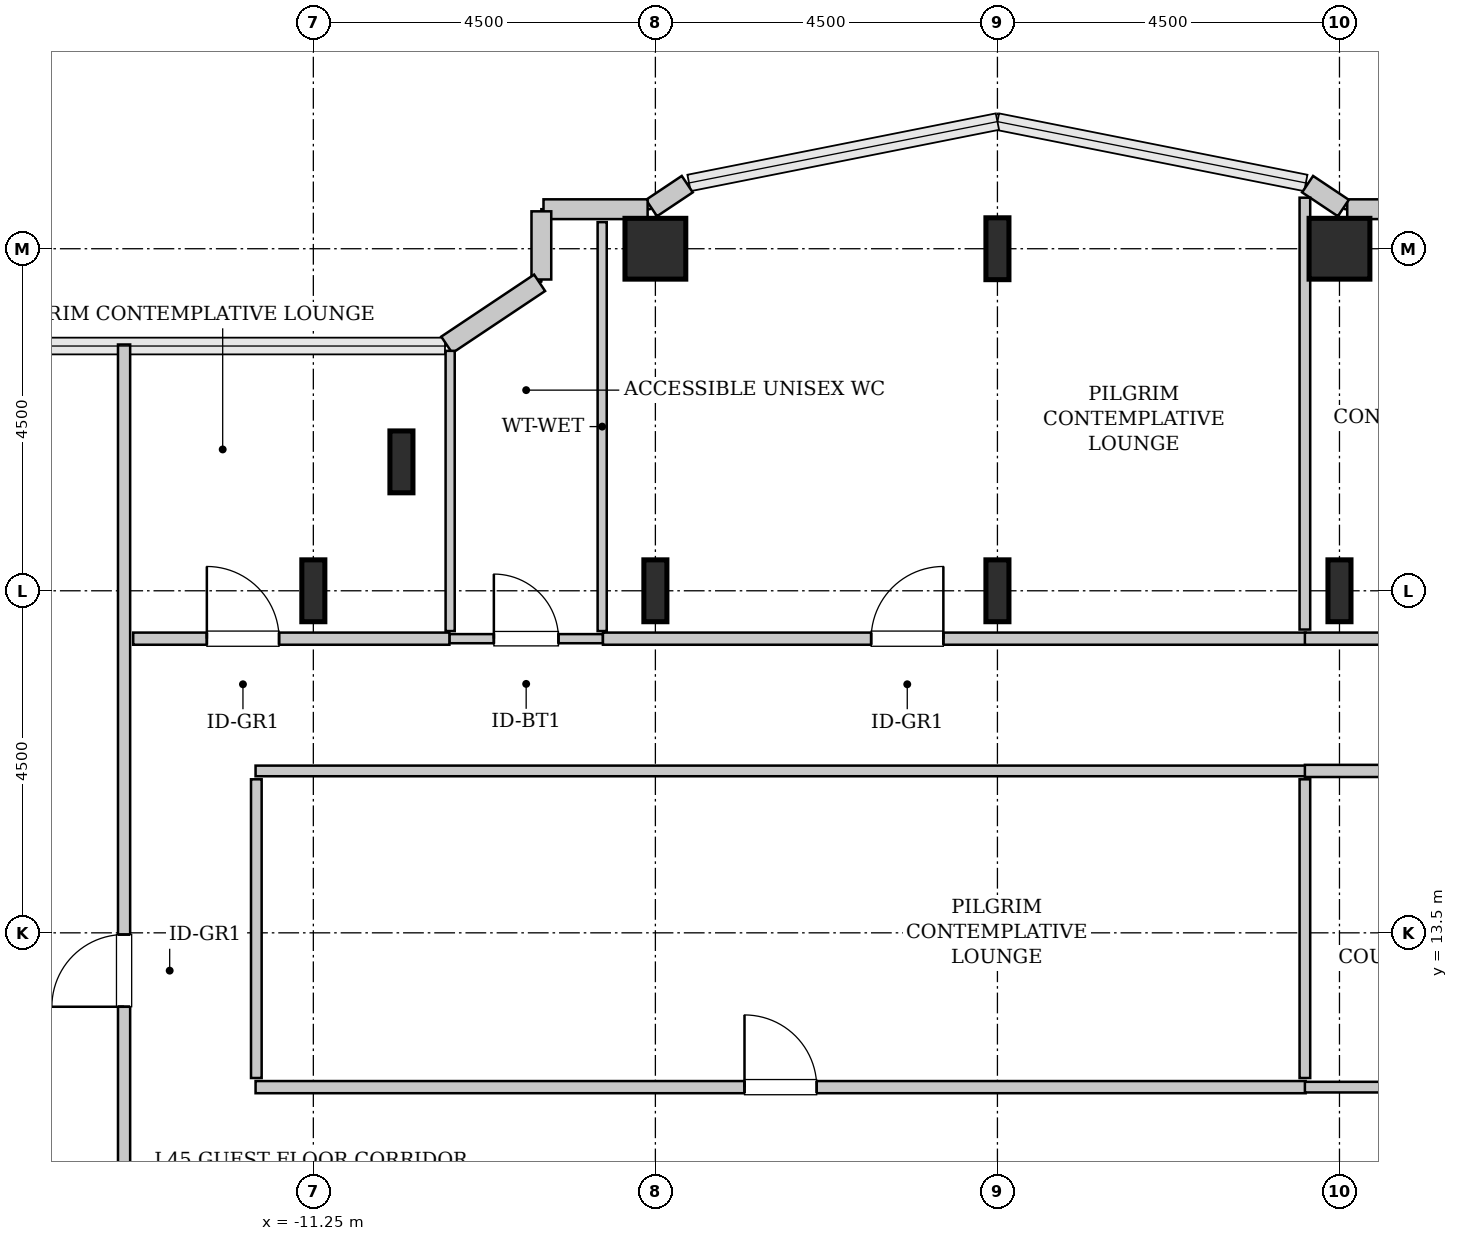
"""IFC4 building model, lengths in metres.
Left out: names, types, materials, properties, quantities, classifications, styles, units other than length and angle.
Written with IfcOpenShell. Run it as: python <this file> out.ifc"""

import sys

from ifc_helpers import new_model, si_unit, direction, frame, frame_2d, origin, origin_2d, place, context, subcontext, project, spatial, rectangle, hollow_rectangle, i_section, extrude, source, transform, mapped, element, fill, save


model = new_model("IFC4")
c1 = context("Model", 3, precision=1e-05, world=origin(), true_north=direction((0.0, 1.0)))
c2 = subcontext(c1, "Body", "Model", "MODEL_VIEW")
j1 = project(units=[si_unit("LENGTHUNIT", "METRE"), si_unit("PLANEANGLEUNIT", "RADIAN")], contexts=[c1])
p1 = place(None, origin())
s1 = spatial("IfcSite", under=j1, at=p1, CompositionType="ELEMENT")
p2 = place(p1, origin())
s2 = spatial("IfcBuilding", under=s1, at=p2, CompositionType="ELEMENT")
p3 = place(p2, frame((0.0, 0.0, 183.0)))
s3 = spatial("IfcBuildingStorey", under=s2, at=p3, CompositionType="ELEMENT", Elevation=183.0)
m1 = source(origin(), c2, "Body", "SweptSolid", [
    extrude(i_section(OverallWidth=0.303, OverallDepth=0.814, WebThickness=0.021, FlangeThickness=0.04, FilletRadius=0.03, at=origin_2d()), origin(), (0.0, 0.0, 1.0), 3.8),
])
for number, where, z_axis, x_axis in (
    (1, (-11.25, 18.0, 0.0), (0.0, 0.0, 1.0), (1.0, 0.0, 0.0)),
    (2, (-10.091, 19.696, 0.0), (0.0, 0.0, 1.0), (1.0, 0.0, 0.0)),
    (3, (-6.75, 18.0, 0.0), (0.0, 0.0, 1.0), (1.0, 0.0, 0.0)),
):
    element("IfcColumn", number, at=place(p3, frame(where, z_axis=z_axis, x_axis=x_axis)), inside=s3, PredefinedType="COLUMN", context=c2, shape_type="MappedRepresentation", body=[
        mapped(m1, transform((0.0, 0.0, 0.0), x_axis=(1.0, 0.0, 0.0), y_axis=(0.0, 1.0, 0.0), z_axis=(0.0, 0.0, 1.0), scale=1.0)),
    ])
m2 = source(origin(), c2, "Body", "SweptSolid", [
    extrude(hollow_rectangle(XDim=0.8, YDim=0.8, WallThickness=0.04, InnerFilletRadius=0.04, OuterFilletRadius=0.08, at=origin_2d()), origin(), (0.0, 0.0, 1.0), 3.8),
])
p4 = place(p3, frame((-6.75, 22.5, 0.0), z_axis=(0.0, 0.0, 1.0), x_axis=(1.0, 0.0, 0.0)))
e4 = element("IfcColumn", 4, at=p4, inside=s3, PredefinedType="COLUMN", context=c2, shape_type="MappedRepresentation", body=[
    mapped(m2, transform((0.0, 0.0, 0.0), x_axis=(1.0, 0.0, 0.0), y_axis=(0.0, 1.0, 0.0), z_axis=(0.0, 0.0, 1.0), scale=1.0)),
])
for number, where, z_axis, x_axis in (
    (5, (-2.25, 18.0, 0.0), (0.0, 0.0, 1.0), (1.0, 0.0, 0.0)),
    (6, (-2.25, 22.5, 0.0), (0.0, 0.0, 1.0), (1.0, 0.0, 0.0)),
    (7, (2.25, 18.0, 0.0), (0.0, 0.0, 1.0), (1.0, 0.0, 0.0)),
):
    element("IfcColumn", number, at=place(p3, frame(where, z_axis=z_axis, x_axis=x_axis)), inside=s3, PredefinedType="COLUMN", context=c2, shape_type="MappedRepresentation", body=[
        mapped(m1, transform((0.0, 0.0, 0.0), x_axis=(1.0, 0.0, 0.0), y_axis=(0.0, 1.0, 0.0), z_axis=(0.0, 0.0, 1.0), scale=1.0)),
    ])
p5 = place(p3, frame((2.25, 22.5, 0.0), z_axis=(0.0, 0.0, 1.0), x_axis=(1.0, 0.0, 0.0)))
e8 = element("IfcColumn", 8, at=p5, inside=s3, PredefinedType="COLUMN", context=c2, shape_type="MappedRepresentation", body=[
    mapped(m2, transform((0.0, 0.0, 0.0), x_axis=(1.0, 0.0, 0.0), y_axis=(0.0, 1.0, 0.0), z_axis=(0.0, 0.0, 1.0), scale=1.0)),
])
m3 = source(origin(), c2, "Body", "SweptSolid", [
    extrude(rectangle(XDim=1.37, YDim=0.26, at=frame_2d((0.685, 0.0))), origin(), (0.0, 0.0, 1.0), 3.55),
])
p6 = place(p3, frame((3.722, 23.02, 0.0), z_axis=(0.0, 0.0, 1.0), x_axis=(-1.0, 0.0, 0.0)))
e9 = element("IfcWall", 9, at=p6, inside=s3, PredefinedType="SOLIDWALL", context=c2, shape_type="MappedRepresentation", body=[
    mapped(m3, transform((0.0, 0.0, 0.0), x_axis=(1.0, 0.0, 0.0), y_axis=(0.0, 1.0, 0.0), z_axis=(0.0, 0.0, 1.0), scale=1.0)),
])
m4 = source(origin(), c2, "Body", "SweptSolid", [
    extrude(rectangle(XDim=0.565, YDim=0.26, at=frame_2d((0.283, 0.0))), origin(), (0.0, 0.0, 1.0), 3.55),
])
for number, where, z_axis, x_axis in (
    (10, (2.301, 23.036, 0.0), (0.0, 0.0, 1.0), (-0.832, 0.555, 0.0)),
    (11, (-6.331, 23.35, 0.0), (0.0, 0.0, 1.0), (-0.832, -0.555, 0.0)),
):
    element("IfcWall", number, at=place(p3, frame(where, z_axis=z_axis, x_axis=x_axis)), inside=s3, PredefinedType="SOLIDWALL", context=c2, shape_type="MappedRepresentation", body=[
        mapped(m4, transform((0.0, 0.0, 0.0), x_axis=(1.0, 0.0, 0.0), y_axis=(0.0, 1.0, 0.0), z_axis=(0.0, 0.0, 1.0), scale=1.0)),
    ])
p7 = place(p3, frame((-6.852, 23.02, 0.0), z_axis=(0.0, 0.0, 1.0), x_axis=(-1.0, 0.0, 0.0)))
e12 = element("IfcWall", 12, at=p7, inside=s3, PredefinedType="SOLIDWALL", context=c2, shape_type="MappedRepresentation", body=[
    mapped(m3, transform((0.0, 0.0, 0.0), x_axis=(1.0, 0.0, 0.0), y_axis=(0.0, 1.0, 0.0), z_axis=(0.0, 0.0, 1.0), scale=1.0)),
])
m5 = source(origin(), c2, "Body", "SweptSolid", [
    extrude(rectangle(XDim=0.897, YDim=0.26, at=frame_2d((0.448, 0.0))), origin(), (0.0, 0.0, 1.0), 3.55),
])
p8 = place(p3, frame((-8.25, 22.992, 0.0), z_axis=(0.0, 0.0, 1.0), x_axis=(0.0, -1.0, 0.0)))
e13 = element("IfcWall", 13, at=p8, inside=s3, PredefinedType="SOLIDWALL", context=c2, shape_type="MappedRepresentation", body=[
    mapped(m5, transform((0.0, 0.0, 0.0), x_axis=(1.0, 0.0, 0.0), y_axis=(0.0, 1.0, 0.0), z_axis=(0.0, 0.0, 1.0), scale=1.0)),
])
m6 = source(origin(), c2, "Body", "SweptSolid", [
    extrude(rectangle(XDim=1.469, YDim=0.26, at=frame_2d((0.734, 0.0))), origin(), (0.0, 0.0, 1.0), 3.55),
])
p9 = place(p3, frame((-8.273, 22.052, 0.0), z_axis=(0.0, 0.0, 1.0), x_axis=(-0.831461760506, -0.555581983884, 0.0)))
e14 = element("IfcWall", 14, at=p9, inside=s3, PredefinedType="SOLIDWALL", context=c2, shape_type="MappedRepresentation", body=[
    mapped(m6, transform((0.0, 0.0, 0.0), x_axis=(1.0, 0.0, 0.0), y_axis=(0.0, 1.0, 0.0), z_axis=(0.0, 0.0, 1.0), scale=1.0)),
])
m7 = source(origin(), c2, "Body", "SweptSolid", [
    extrude(rectangle(XDim=2.02, YDim=0.12, at=frame_2d((1.01, 0.0))), origin(), (0.0, 0.0, 1.0), 3.535),
])
p10 = place(p3, frame((-9.46, 17.37, 0.0), z_axis=(0.0, 0.0, 1.0), x_axis=(1.0, 0.0, 0.0)))
e15 = element("IfcWall", 15, at=p10, inside=s3, PredefinedType="PLUMBINGWALL", context=c2, shape_type="MappedRepresentation", body=[
    mapped(m7, transform((0.0, 0.0, 0.0), x_axis=(1.0, 0.0, 0.0), y_axis=(0.0, 1.0, 0.0), z_axis=(0.0, 0.0, 1.0), scale=1.0)),
])
p11 = place(p10, frame((0.585, 0.0, 0.0)))
e16 = element("IfcOpeningElement", 16, at=p11, cuts=e15, PredefinedType="OPENING", context=c2, shape_type="SweptSolid", body=[
    extrude(rectangle(XDim=0.85, YDim=2.1, at=frame_2d((0.425, 1.05))), frame((0.0, 0.07, 0.0), z_axis=(0.0, -1.0, 0.0), x_axis=(1.0, 0.0, 0.0)), (0.0, 0.0, 1.0), 0.14),
])
m8 = source(origin(), c2, "Body", "SweptSolid", [
    extrude(rectangle(XDim=5.38, YDim=0.12, at=frame_2d((2.69, 0.0))), origin(), (0.0, 0.0, 1.0), 3.535),
])
p12 = place(p3, frame((-7.45, 17.47, 0.0), z_axis=(0.0, 0.0, 1.0), x_axis=(0.0, 1.0, 0.0)))
e17 = element("IfcWall", 17, at=p12, inside=s3, PredefinedType="PLUMBINGWALL", context=c2, shape_type="MappedRepresentation", body=[
    mapped(m8, transform((0.0, 0.0, 0.0), x_axis=(1.0, 0.0, 0.0), y_axis=(0.0, 1.0, 0.0), z_axis=(0.0, 0.0, 1.0), scale=1.0)),
])
m9 = source(origin(), c2, "Body", "SweptSolid", [
    extrude(rectangle(XDim=3.687, YDim=0.12, at=frame_2d((1.843, 0.0))), origin(), (0.0, 0.0, 1.0), 3.535),
])
p13 = place(p3, frame((-9.45, 17.47, 0.0), z_axis=(0.0, 0.0, 1.0), x_axis=(0.0, 1.0, 0.0)))
e18 = element("IfcWall", 18, at=p13, inside=s3, PredefinedType="PLUMBINGWALL", context=c2, shape_type="MappedRepresentation", body=[
    mapped(m9, transform((0.0, 0.0, 0.0), x_axis=(1.0, 0.0, 0.0), y_axis=(0.0, 1.0, 0.0), z_axis=(0.0, 0.0, 1.0), scale=1.0)),
])
m10 = source(origin(), c2, "Body", "SweptSolid", [
    extrude(rectangle(XDim=12.645, YDim=0.16, at=frame_2d((6.323, 0.0))), origin(), (0.0, 0.0, 1.0), 3.535),
])
p14 = place(p3, frame((-13.74, 8.595, 0.0), z_axis=(0.0, 0.0, 1.0), x_axis=(0.0, 1.0, 0.0)))
e19 = element("IfcWall", 19, at=p14, inside=s3, PredefinedType="PARTITIONING", context=c2, shape_type="MappedRepresentation", body=[
    mapped(m10, transform((0.0, 0.0, 0.0), x_axis=(1.0, 0.0, 0.0), y_axis=(0.0, 1.0, 0.0), z_axis=(0.0, 0.0, 1.0), scale=1.0)),
])
p15 = place(p14, frame((3.933, 0.0, 0.0)))
e20 = element("IfcOpeningElement", 20, at=p15, cuts=e19, PredefinedType="OPENING", context=c2, shape_type="SweptSolid", body=[
    extrude(rectangle(XDim=0.95, YDim=2.1, at=frame_2d((0.475, 1.05))), frame((0.0, 0.09, 0.0), z_axis=(0.0, -1.0, 0.0), x_axis=(1.0, 0.0, 0.0)), (0.0, 0.0, 1.0), 0.18),
])
m11 = source(origin(), c2, "Body", "SweptSolid", [
    extrude(rectangle(XDim=13.815, YDim=0.16, at=frame_2d((6.907, 0.0))), origin(), (0.0, 0.0, 1.0), 3.535),
])
p16 = place(p3, frame((-12.01, 11.47, 0.0), z_axis=(0.0, 0.0, 1.0), x_axis=(1.0, 0.0, 0.0)))
e21 = element("IfcWall", 21, at=p16, inside=s3, PredefinedType="PARTITIONING", context=c2, shape_type="MappedRepresentation", body=[
    mapped(m11, transform((0.0, 0.0, 0.0), x_axis=(1.0, 0.0, 0.0), y_axis=(0.0, 1.0, 0.0), z_axis=(0.0, 0.0, 1.0), scale=1.0)),
])
p17 = place(p16, frame((6.433, 0.0, 0.0)))
e22 = element("IfcOpeningElement", 22, at=p17, cuts=e21, PredefinedType="OPENING", context=c2, shape_type="SweptSolid", body=[
    extrude(rectangle(XDim=0.95, YDim=2.1, at=frame_2d((0.475, 1.05))), frame((0.0, 0.09, 0.0), z_axis=(0.0, -1.0, 0.0), x_axis=(1.0, 0.0, 0.0)), (0.0, 0.0, 1.0), 0.18),
])
m12 = source(origin(), c2, "Body", "SweptSolid", [
    extrude(rectangle(XDim=13.815, YDim=0.14, at=frame_2d((6.907, 0.0))), origin(), (0.0, 0.0, 1.0), 3.535),
])
p18 = place(p3, frame((-12.01, 15.63, 0.0), z_axis=(0.0, 0.0, 1.0), x_axis=(1.0, 0.0, 0.0)))
e23 = element("IfcWall", 23, at=p18, inside=s3, PredefinedType="PARTITIONING", context=c2, shape_type="MappedRepresentation", body=[
    mapped(m12, transform((0.0, 0.0, 0.0), x_axis=(1.0, 0.0, 0.0), y_axis=(0.0, 1.0, 0.0), z_axis=(0.0, 0.0, 1.0), scale=1.0)),
])
m13 = source(origin(), c2, "Body", "SweptSolid", [
    extrude(rectangle(XDim=3.93, YDim=0.14, at=frame_2d((1.965, 0.0))), origin(), (0.0, 0.0, 1.0), 3.535),
])
for number, where, z_axis, x_axis in (
    (24, (-12.0, 11.59, 0.0), (0.0, 0.0, 1.0), (0.0, 1.0, 0.0)),
    (25, (1.795, 11.59, 0.0), (0.0, 0.0, 1.0), (0.0, 1.0, 0.0)),
):
    element("IfcWall", number, at=place(p3, frame(where, z_axis=z_axis, x_axis=x_axis)), inside=s3, PredefinedType="PARTITIONING", context=c2, shape_type="MappedRepresentation", body=[
        mapped(m13, transform((0.0, 0.0, 0.0), x_axis=(1.0, 0.0, 0.0), y_axis=(0.0, 1.0, 0.0), z_axis=(0.0, 0.0, 1.0), scale=1.0)),
    ])
m14 = source(origin(), c2, "Body", "SweptSolid", [
    extrude(rectangle(XDim=9.245, YDim=0.16, at=frame_2d((4.623, 0.0))), origin(), (0.0, 0.0, 1.0), 3.535),
])
p19 = place(p3, frame((-7.44, 17.37, 0.0), z_axis=(0.0, 0.0, 1.0), x_axis=(1.0, 0.0, 0.0)))
e26 = element("IfcWall", 26, at=p19, inside=s3, PredefinedType="PARTITIONING", context=c2, shape_type="MappedRepresentation", body=[
    mapped(m14, transform((0.0, 0.0, 0.0), x_axis=(1.0, 0.0, 0.0), y_axis=(0.0, 1.0, 0.0), z_axis=(0.0, 0.0, 1.0), scale=1.0)),
])
p20 = place(p19, frame((3.529, 0.0, 0.0)))
e27 = element("IfcOpeningElement", 27, at=p20, cuts=e26, PredefinedType="OPENING", context=c2, shape_type="SweptSolid", body=[
    extrude(rectangle(XDim=0.95, YDim=2.1, at=frame_2d((0.475, 1.05))), frame((0.0, 0.09, 0.0), z_axis=(0.0, -1.0, 0.0), x_axis=(1.0, 0.0, 0.0)), (0.0, 0.0, 1.0), 0.18),
])
m15 = source(origin(), c2, "Body", "SweptSolid", [
    extrude(rectangle(XDim=5.681, YDim=0.14, at=frame_2d((2.841, 0.0))), origin(), (0.0, 0.0, 1.0), 2.875),
])
p21 = place(p3, frame((1.795, 17.49, 0.0), z_axis=(0.0, 0.0, 1.0), x_axis=(0.0, 1.0, 0.0)))
e28 = element("IfcWall", 28, at=p21, inside=s3, PredefinedType="PARTITIONING", context=c2, shape_type="MappedRepresentation", body=[
    mapped(m15, transform((0.0, 0.0, 0.0), x_axis=(1.0, 0.0, 0.0), y_axis=(0.0, 1.0, 0.0), z_axis=(0.0, 0.0, 1.0), scale=1.0)),
])
m16 = source(origin(), c2, "Body", "SweptSolid", [
    extrude(rectangle(XDim=4.16, YDim=0.16, at=frame_2d((2.08, 0.0))), origin(), (0.0, 0.0, 1.0), 3.535),
])
p22 = place(p3, frame((-13.62, 17.37, 0.0), z_axis=(0.0, 0.0, 1.0), x_axis=(1.0, 0.0, 0.0)))
e29 = element("IfcWall", 29, at=p22, inside=s3, PredefinedType="PARTITIONING", context=c2, shape_type="MappedRepresentation", body=[
    mapped(m16, transform((0.0, 0.0, 0.0), x_axis=(1.0, 0.0, 0.0), y_axis=(0.0, 1.0, 0.0), z_axis=(0.0, 0.0, 1.0), scale=1.0)),
])
p23 = place(p22, frame((0.969, 0.0, 0.0)))
e30 = element("IfcOpeningElement", 30, at=p23, cuts=e29, PredefinedType="OPENING", context=c2, shape_type="SweptSolid", body=[
    extrude(rectangle(XDim=0.95, YDim=2.1, at=frame_2d((0.475, 1.05))), frame((0.0, 0.09, 0.0), z_axis=(0.0, -1.0, 0.0), x_axis=(1.0, 0.0, 0.0)), (0.0, 0.0, 1.0), 0.18),
])
m17 = source(origin(), c2, "Body", "SweptSolid", [
    extrude(rectangle(XDim=6.61, YDim=0.16, at=frame_2d((3.305, 0.0))), origin(), (0.0, 0.0, 1.0), 3.535),
])
p24 = place(p3, frame((1.795, 17.37, 0.0), z_axis=(0.0, 0.0, 1.0), x_axis=(1.0, 0.0, 0.0)))
e31 = element("IfcWall", 31, at=p24, inside=s3, PredefinedType="PARTITIONING", context=c2, shape_type="MappedRepresentation", body=[
    mapped(m17, transform((0.0, 0.0, 0.0), x_axis=(1.0, 0.0, 0.0), y_axis=(0.0, 1.0, 0.0), z_axis=(0.0, 0.0, 1.0), scale=1.0)),
])
p25 = place(p24, frame((2.83, 0.0, 0.0)))
e32 = element("IfcOpeningElement", 32, at=p25, cuts=e31, PredefinedType="OPENING", context=c2, shape_type="SweptSolid", body=[
    extrude(rectangle(XDim=0.95, YDim=2.1, at=frame_2d((0.475, 1.05))), frame((0.0, 0.09, 0.0), z_axis=(0.0, -1.0, 0.0), x_axis=(1.0, 0.0, 0.0)), (0.0, 0.0, 1.0), 0.18),
])
p26 = place(p3, frame((1.795, 15.63, 0.0), z_axis=(0.0, 0.0, 1.0), x_axis=(1.0, 0.0, 0.0)))
e33 = element("IfcWall", 33, at=p26, inside=s3, PredefinedType="PARTITIONING", context=c2, shape_type="MappedRepresentation", body=[
    mapped(m17, transform((0.0, 0.0, 0.0), x_axis=(1.0, 0.0, 0.0), y_axis=(0.0, 1.0, 0.0), z_axis=(0.0, 0.0, 1.0), scale=1.0)),
])
p27 = place(p26, frame((2.83, 0.0, 0.0)))
e34 = element("IfcOpeningElement", 34, at=p27, cuts=e33, PredefinedType="OPENING", context=c2, shape_type="SweptSolid", body=[
    extrude(rectangle(XDim=0.95, YDim=2.1, at=frame_2d((0.475, 1.05))), frame((0.0, 0.09, 0.0), z_axis=(0.0, -1.0, 0.0), x_axis=(1.0, 0.0, 0.0)), (0.0, 0.0, 1.0), 0.18),
])
m18 = source(origin(), c2, "Body", "SweptSolid", [
    extrude(rectangle(XDim=6.61, YDim=0.14, at=frame_2d((3.305, 0.0))), origin(), (0.0, 0.0, 1.0), 3.535),
])
p28 = place(p3, frame((1.795, 11.47, 0.0), z_axis=(0.0, 0.0, 1.0), x_axis=(1.0, 0.0, 0.0)))
e35 = element("IfcWall", 35, at=p28, inside=s3, PredefinedType="PARTITIONING", context=c2, shape_type="MappedRepresentation", body=[
    mapped(m18, transform((0.0, 0.0, 0.0), x_axis=(1.0, 0.0, 0.0), y_axis=(0.0, 1.0, 0.0), z_axis=(0.0, 0.0, 1.0), scale=1.0)),
])
m19 = source(origin(), c2, "Body", "SweptSolid", [
    extrude(rectangle(XDim=0.85, YDim=2.1, at=frame_2d((0.425, 1.05))), frame((0.0, 0.025, 0.0), z_axis=(0.0, -1.0, 0.0), x_axis=(1.0, 0.0, 0.0)), (0.0, 0.0, 1.0), 0.05),
])
p29 = place(p11, origin())
e36 = element("IfcDoor", 36, at=p29, inside=s3, OperationType="SINGLE_SWING_LEFT", PredefinedType="DOOR", context=c2, shape_type="MappedRepresentation", body=[
    mapped(m19, transform((0.0, 0.0, 0.0), x_axis=(1.0, 0.0, 0.0), y_axis=(0.0, 1.0, 0.0), z_axis=(0.0, 0.0, 1.0), scale=1.0)),
])
fill(e16, e36)
m20 = source(origin(), c2, "Body", "SweptSolid", [
    extrude(rectangle(XDim=0.95, YDim=2.1, at=frame_2d((0.475, 1.05))), frame((0.0, 0.025, 0.0), z_axis=(0.0, -1.0, 0.0), x_axis=(1.0, 0.0, 0.0)), (0.0, 0.0, 1.0), 0.05),
])
p30 = place(p15, origin())
e37 = element("IfcDoor", 37, at=p30, inside=s3, OperationType="SINGLE_SWING_LEFT", PredefinedType="DOOR", context=c2, shape_type="MappedRepresentation", body=[
    mapped(m20, transform((0.0, 0.0, 0.0), x_axis=(1.0, 0.0, 0.0), y_axis=(0.0, 1.0, 0.0), z_axis=(0.0, 0.0, 1.0), scale=1.0)),
])
fill(e20, e37)
p31 = place(p17, origin())
e38 = element("IfcDoor", 38, at=p31, inside=s3, OperationType="SINGLE_SWING_LEFT", PredefinedType="DOOR", context=c2, shape_type="MappedRepresentation", body=[
    mapped(m20, transform((0.0, 0.0, 0.0), x_axis=(1.0, 0.0, 0.0), y_axis=(0.0, 1.0, 0.0), z_axis=(0.0, 0.0, 1.0), scale=1.0)),
])
fill(e22, e38)
p32 = place(p20, origin())
e39 = element("IfcDoor", 39, at=p32, inside=s3, OperationType="SINGLE_SWING_RIGHT", PredefinedType="DOOR", context=c2, shape_type="MappedRepresentation", body=[
    mapped(m20, transform((0.0, 0.0, 0.0), x_axis=(1.0, 0.0, 0.0), y_axis=(0.0, 1.0, 0.0), z_axis=(0.0, 0.0, 1.0), scale=1.0)),
])
fill(e27, e39)
p33 = place(p23, origin())
e40 = element("IfcDoor", 40, at=p33, inside=s3, OperationType="SINGLE_SWING_LEFT", PredefinedType="DOOR", context=c2, shape_type="MappedRepresentation", body=[
    mapped(m20, transform((0.0, 0.0, 0.0), x_axis=(1.0, 0.0, 0.0), y_axis=(0.0, 1.0, 0.0), z_axis=(0.0, 0.0, 1.0), scale=1.0)),
])
fill(e30, e40)
save(model, sys.argv[1])
